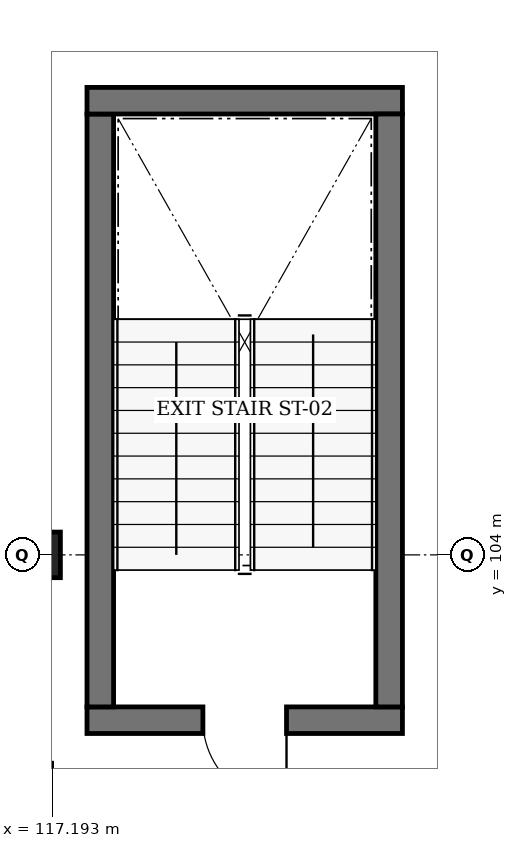
"""IFC4 building model, lengths in metres.
Left out: names, types, materials, properties, quantities, classifications, styles, units other than length and angle.
Written with IfcOpenShell. Run it as: python <this file> out.ifc"""

import sys

from ifc_helpers import new_model, si_unit, direction, frame, frame_2d, origin, origin_2d, place, context, subcontext, project, spatial, rectangle, extrude, element, fill, save


model = new_model("IFC4")
c1 = context("Model", 3, precision=1e-05, world=origin(), true_north=direction((0.0, 1.0)))
c2 = subcontext(c1, "Body", "Model", "MODEL_VIEW")
j1 = project(units=[si_unit("LENGTHUNIT", "METRE"), si_unit("PLANEANGLEUNIT", "RADIAN")], contexts=[c1])
p1 = place(None, origin())
s1 = spatial("IfcSite", under=j1, at=p1, CompositionType="ELEMENT")
p2 = place(p1, origin())
s2 = spatial("IfcBuilding", under=s1, at=p2, CompositionType="ELEMENT")
p3 = place(p2, frame((0.0, 0.0, 9.0)))
s3 = spatial("IfcBuildingStorey", under=s2, at=p3, CompositionType="ELEMENT", Elevation=9.0)
p4 = place(p3, frame((117.0, 104.0, 0.0), z_axis=(0.0, 0.0, 1.0), x_axis=(1.0, 0.0, 0.0)))
e1 = element("IfcColumn", 1, at=p4, inside=s3, PredefinedType="COLUMN", context=c2, shape_type="SweptSolid", body=[
    extrude(rectangle(XDim=0.6, YDim=0.6, at=origin_2d()), origin(), (0.0, 0.0, 1.0), 4.2),
])
p5 = place(p3, frame((121.8, 101.825, 0.0), z_axis=(0.0, 0.0, 1.0), x_axis=(-1.0, 0.0, 0.0)))
e2 = element("IfcWall", 2, at=p5, inside=s3, PredefinedType="SOLIDWALL", context=c2, shape_type="SweptSolid", body=[
    extrude(rectangle(XDim=4.15, YDim=0.35, at=frame_2d((2.075, 0.0))), origin(), (0.0, 0.0, 1.0), 4.2),
])
p6 = place(p5, frame((1.525, 0.0, 0.0)))
e3 = element("IfcOpeningElement", 3, at=p6, cuts=e2, PredefinedType="OPENING", context=c2, shape_type="SweptSolid", body=[
    extrude(rectangle(XDim=1.1, YDim=2.15, at=frame_2d((0.55, 1.075))), frame((0.0, 0.195, 0.0), z_axis=(0.0, -1.0, 0.0), x_axis=(1.0, 0.0, 0.0)), (0.0, 0.0, 1.0), 0.39),
])
p7 = place(p3, frame((117.825, 102.0, 0.0), z_axis=(0.0, 0.0, 1.0), x_axis=(0.0, 1.0, 0.0)))
e4 = element("IfcWall", 4, at=p7, inside=s3, PredefinedType="SOLIDWALL", context=c2, shape_type="SweptSolid", body=[
    extrude(rectangle(XDim=7.8, YDim=0.35, at=frame_2d((3.9, 0.0))), origin(), (0.0, 0.0, 1.0), 4.2),
])
p8 = place(p3, frame((117.65, 109.975, 0.0), z_axis=(0.0, 0.0, 1.0), x_axis=(1.0, 0.0, 0.0)))
e5 = element("IfcWall", 5, at=p8, inside=s3, PredefinedType="SOLIDWALL", context=c2, shape_type="SweptSolid", body=[
    extrude(rectangle(XDim=4.15, YDim=0.35, at=frame_2d((2.075, 0.0))), origin(), (0.0, 0.0, 1.0), 4.2),
])
p9 = place(p3, frame((121.625, 109.8, 0.0), z_axis=(0.0, 0.0, 1.0), x_axis=(0.0, -1.0, 0.0)))
e6 = element("IfcWall", 6, at=p9, inside=s3, PredefinedType="SOLIDWALL", context=c2, shape_type="SweptSolid", body=[
    extrude(rectangle(XDim=7.8, YDim=0.35, at=frame_2d((3.9, 0.0))), origin(), (0.0, 0.0, 1.0), 4.2),
])
p10 = place(p3, frame((117.2, 101.2, 0.0), z_axis=(0.0, 0.0, 1.0), x_axis=(-1.0, 0.0, 0.0)))
e7 = element("IfcWall", 7, at=p10, inside=s3, PredefinedType="PARTITIONING", context=c2, shape_type="SweptSolid", body=[
    extrude(rectangle(XDim=8.8, YDim=0.15, at=frame_2d((4.4, 0.0))), origin(), (0.0, 0.0, 1.0), 3.93),
])
p11 = place(p10, frame((3.039, 0.0, 0.0)))
e8 = element("IfcOpeningElement", 8, at=p11, cuts=e7, PredefinedType="OPENING", context=c2, shape_type="SweptSolid", body=[
    extrude(rectangle(XDim=1.5, YDim=2.25, at=frame_2d((0.75, 1.125))), frame((0.0, 0.095, 0.0), z_axis=(0.0, -1.0, 0.0), x_axis=(1.0, 0.0, 0.0)), (0.0, 0.0, 1.0), 0.19),
])
p12 = place(p6, origin())
e9 = element("IfcDoor", 9, at=p12, inside=s3, OperationType="SINGLE_SWING_LEFT", PredefinedType="DOOR", context=c2, shape_type="SweptSolid", body=[
    extrude(rectangle(XDim=1.1, YDim=2.15, at=frame_2d((0.55, 1.075))), frame((0.0, 0.025, 0.0), z_axis=(0.0, -1.0, 0.0), x_axis=(1.0, 0.0, 0.0)), (0.0, 0.0, 1.0), 0.05),
])
fill(e3, e9)
save(model, sys.argv[1])
